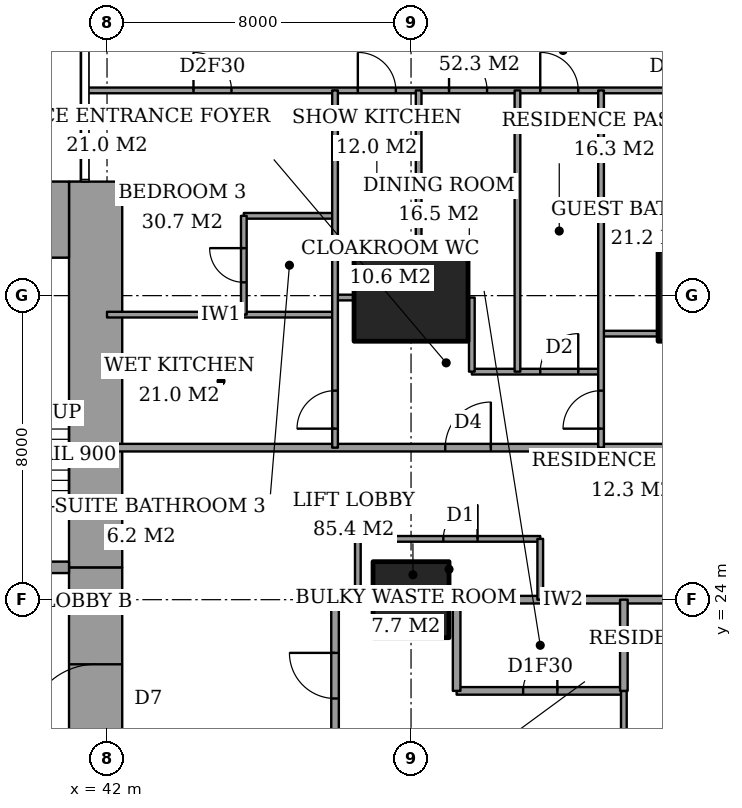
"""IFC4 building model, lengths in metres.
Left out: names, types, materials, properties, quantities, classifications, styles, units other than length and angle.
Written with IfcOpenShell. Run it as: python <this file> out.ifc"""

import sys

from ifc_helpers import new_model, si_unit, direction, frame, frame_2d, origin, origin_2d, place, context, subcontext, project, spatial, rectangle, extrude, element, fill, save


model = new_model("IFC4")
c1 = context("Model", 3, precision=1e-05, world=origin(), true_north=direction((0.0, 1.0)))
c2 = subcontext(c1, "Body", "Model", "MODEL_VIEW")
j1 = project(units=[si_unit("LENGTHUNIT", "METRE"), si_unit("PLANEANGLEUNIT", "RADIAN")], contexts=[c1])
p1 = place(None, origin())
s1 = spatial("IfcSite", under=j1, at=p1, CompositionType="ELEMENT")
p2 = place(p1, origin())
s2 = spatial("IfcBuilding", under=s1, at=p2, CompositionType="ELEMENT")
p3 = place(p2, frame((0.0, 0.0, 121.4)))
s3 = spatial("IfcBuildingStorey", under=s2, at=p3, CompositionType="ELEMENT", Elevation=121.4)
p4 = place(p3, frame((50.0, 24.0, 0.0), z_axis=(0.0, 0.0, 1.0), x_axis=(1.0, 0.0, 0.0)))
e1 = element("IfcColumn", 1, at=p4, inside=s3, PredefinedType="COLUMN", context=c2, shape_type="SweptSolid", body=[
    extrude(rectangle(XDim=2.0, YDim=2.0, at=origin_2d()), origin(), (0.0, 0.0, 1.0), 3.6),
])
for number, where, z_axis, x_axis in (
    (2, (50.0, 32.0, 0.0), (0.0, 0.0, 1.0), (1.0, 0.0, 0.0)),
    (3, (58.0, 32.0, 0.0), (0.0, 0.0, 1.0), (1.0, 0.0, 0.0)),
):
    element("IfcColumn", number, at=place(p3, frame(where, z_axis=z_axis, x_axis=x_axis)), inside=s3, PredefinedType="COLUMN", context=c2, shape_type="SweptSolid", body=[
        extrude(rectangle(XDim=3.0, YDim=2.4, at=origin_2d()), origin(), (0.0, 0.0, 1.0), 3.6),
    ])
p5 = place(p3, frame((37.85, 34.0, 0.0), z_axis=(0.0, 0.0, 1.0), x_axis=(1.0, 0.0, 0.0)))
e4 = element("IfcWall", 4, at=p5, inside=s3, PredefinedType="SHEAR", context=c2, shape_type="SweptSolid", body=[
    extrude(rectangle(XDim=3.15, YDim=2.0, at=frame_2d((1.575, 0.0))), origin(), (0.0, 0.0, 1.0), 3.6),
])
p6 = place(p3, frame((41.7, 13.0, 0.0), z_axis=(0.0, 0.0, 1.0), x_axis=(0.0, 1.0, 0.0)))
e5 = element("IfcWall", 5, at=p6, inside=s3, PredefinedType="SHEAR", context=c2, shape_type="SweptSolid", body=[
    extrude(rectangle(XDim=11.85, YDim=1.4, at=frame_2d((5.925, 0.0))), origin(), (0.0, 0.0, 1.0), 3.6),
])
p7 = place(p6, frame((7.5, 0.0, 0.0)))
e6 = element("IfcOpeningElement", 6, at=p7, cuts=e5, PredefinedType="OPENING", context=c2, shape_type="SweptSolid", body=[
    extrude(rectangle(XDim=1.8, YDim=2.4, at=frame_2d((0.9, 1.2))), frame((0.0, 0.71, 0.0), z_axis=(0.0, -1.0, 0.0), x_axis=(1.0, 0.0, 0.0)), (0.0, 0.0, 1.0), 1.42),
])
p8 = place(p3, frame((41.7, 24.85, 0.0), z_axis=(0.0, 0.0, 1.0), x_axis=(0.0, 1.0, 0.0)))
e7 = element("IfcWall", 7, at=p8, inside=s3, PredefinedType="SHEAR", context=c2, shape_type="SweptSolid", body=[
    extrude(rectangle(XDim=10.15, YDim=1.4, at=frame_2d((5.075, 0.0))), origin(), (0.0, 0.0, 1.0), 3.6),
])
p9 = place(p3, frame((37.85, 24.85, 0.0), z_axis=(0.0, 0.0, 1.0), x_axis=(1.0, 0.0, 0.0)))
e8 = element("IfcWall", 8, at=p9, inside=s3, PredefinedType="SHEAR", context=c2, shape_type="SweptSolid", body=[
    extrude(rectangle(XDim=3.15, YDim=0.3, at=frame_2d((1.575, 0.0))), origin(), (0.0, 0.0, 1.0), 3.6),
])
p10 = place(p9, frame((0.95, 0.0, 0.0)))
e9 = element("IfcOpeningElement", 9, at=p10, cuts=e8, PredefinedType="OPENING", context=c2, shape_type="SweptSolid", body=[
    extrude(rectangle(XDim=1.0, YDim=2.1, at=frame_2d((0.5, 1.05))), frame((0.0, 0.16, 0.0), z_axis=(0.0, -1.0, 0.0), x_axis=(1.0, 0.0, 0.0)), (0.0, 0.0, 1.0), 0.32),
])
p11 = place(p3, frame((51.2, 21.6, 0.0), z_axis=(0.0, 0.0, 1.0), x_axis=(1.0, 0.0, 0.0)))
e10 = element("IfcWall", 10, at=p11, inside=s3, PredefinedType="PARTITIONING", context=c2, shape_type="SweptSolid", body=[
    extrude(rectangle(XDim=4.4, YDim=0.2, at=frame_2d((2.2, 0.0))), origin(), (0.0, 0.0, 1.0), 3.35),
])
p12 = place(p11, frame((1.75, 0.0, 0.0)))
e11 = element("IfcOpeningElement", 11, at=p12, cuts=e10, PredefinedType="OPENING", context=c2, shape_type="SweptSolid", body=[
    extrude(rectangle(XDim=0.9, YDim=2.1, at=frame_2d((0.45, 1.05))), frame((0.0, 0.11, 0.0), z_axis=(0.0, -1.0, 0.0), x_axis=(1.0, 0.0, 0.0)), (0.0, 0.0, 1.0), 0.22),
])
p13 = place(p3, frame((48.0, 24.0, 0.0), z_axis=(0.0, 0.0, 1.0), x_axis=(1.0, 0.0, 0.0)))
e12 = element("IfcWall", 12, at=p13, inside=s3, PredefinedType="PARTITIONING", context=c2, shape_type="SweptSolid", body=[
    extrude(rectangle(XDim=1.0, YDim=0.2, at=frame_2d((0.5, 0.0))), origin(), (0.0, 0.0, 1.0), 3.35),
])
p14 = place(p3, frame((51.0, 24.0, 0.0), z_axis=(0.0, 0.0, 1.0), x_axis=(1.0, 0.0, 0.0)))
e13 = element("IfcWall", 13, at=p14, inside=s3, PredefinedType="PARTITIONING", context=c2, shape_type="SweptSolid", body=[
    extrude(rectangle(XDim=6.0, YDim=0.2, at=frame_2d((3.0, 0.0))), origin(), (0.0, 0.0, 1.0), 3.35),
])
p15 = place(p3, frame((48.6, 25.6, 0.0), z_axis=(0.0, 0.0, 1.0), x_axis=(1.0, 0.0, 0.0)))
e14 = element("IfcWall", 14, at=p15, inside=s3, PredefinedType="PARTITIONING", context=c2, shape_type="SweptSolid", body=[
    extrude(rectangle(XDim=4.8, YDim=0.15, at=frame_2d((2.4, 0.0))), origin(), (0.0, 0.0, 1.0), 3.35),
])
p16 = place(p15, frame((2.25, 0.0, 0.0)))
e15 = element("IfcOpeningElement", 15, at=p16, cuts=e14, PredefinedType="OPENING", context=c2, shape_type="SweptSolid", body=[
    extrude(rectangle(XDim=0.9, YDim=2.1, at=frame_2d((0.45, 1.05))), frame((0.0, 0.085, 0.0), z_axis=(0.0, -1.0, 0.0), x_axis=(1.0, 0.0, 0.0)), (0.0, 0.0, 1.0), 0.17),
])
p17 = place(p3, frame((42.0, 28.0, 0.0), z_axis=(0.0, 0.0, 1.0), x_axis=(1.0, 0.0, 0.0)))
e16 = element("IfcWall", 16, at=p17, inside=s3, PredefinedType="PARTITIONING", context=c2, shape_type="SweptSolid", body=[
    extrude(rectangle(XDim=17.275, YDim=0.2, at=frame_2d((8.637, 0.0))), origin(), (0.0, 0.0, 1.0), 3.35),
])
p18 = place(p17, frame((8.9, 0.0, 0.0)))
e17 = element("IfcOpeningElement", 17, at=p18, cuts=e16, PredefinedType="OPENING", context=c2, shape_type="SweptSolid", body=[
    extrude(rectangle(XDim=1.2, YDim=2.4, at=frame_2d((0.6, 1.2))), frame((0.0, 0.11, 0.0), z_axis=(0.0, -1.0, 0.0), x_axis=(1.0, 0.0, 0.0)), (0.0, 0.0, 1.0), 0.22),
])
p19 = place(p3, frame((51.6, 30.0, 0.0), z_axis=(0.0, 0.0, 1.0), x_axis=(1.0, 0.0, 0.0)))
e18 = element("IfcWall", 18, at=p19, inside=s3, PredefinedType="PARTITIONING", context=c2, shape_type="SweptSolid", body=[
    extrude(rectangle(XDim=3.4, YDim=0.15, at=frame_2d((1.7, 0.0))), origin(), (0.0, 0.0, 1.0), 3.35),
])
p20 = place(p19, frame((1.8, 0.0, 0.0)))
e19 = element("IfcOpeningElement", 19, at=p20, cuts=e18, PredefinedType="OPENING", context=c2, shape_type="SweptSolid", body=[
    extrude(rectangle(XDim=1.0, YDim=2.1, at=frame_2d((0.5, 1.05))), frame((0.0, 0.085, 0.0), z_axis=(0.0, -1.0, 0.0), x_axis=(1.0, 0.0, 0.0)), (0.0, 0.0, 1.0), 0.17),
])
p21 = place(p3, frame((55.0, 31.0, 0.0), z_axis=(0.0, 0.0, 1.0), x_axis=(1.0, 0.0, 0.0)))
e20 = element("IfcWall", 20, at=p21, inside=s3, PredefinedType="PARTITIONING", context=c2, shape_type="SweptSolid", body=[
    extrude(rectangle(XDim=1.5, YDim=0.15, at=frame_2d((0.75, 0.0))), origin(), (0.0, 0.0, 1.0), 3.35),
])
p22 = place(p3, frame((42.0, 31.5, 0.0), z_axis=(0.0, 0.0, 1.0), x_axis=(1.0, 0.0, 0.0)))
e21 = element("IfcWall", 21, at=p22, inside=s3, PredefinedType="PARTITIONING", context=c2, shape_type="SweptSolid", body=[
    extrude(rectangle(XDim=6.0, YDim=0.15, at=frame_2d((3.0, 0.0))), origin(), (0.0, 0.0, 1.0), 3.35),
])
p23 = place(p3, frame((48.0, 31.95, 0.0), z_axis=(0.0, 0.0, 1.0), x_axis=(1.0, 0.0, 0.0)))
e22 = element("IfcWall", 22, at=p23, inside=s3, PredefinedType="PARTITIONING", context=c2, shape_type="SweptSolid", body=[
    extrude(rectangle(XDim=0.5, YDim=0.15, at=frame_2d((0.25, 0.0))), origin(), (0.0, 0.0, 1.0), 2.634),
])
p24 = place(p3, frame((45.6, 34.1, 0.0), z_axis=(0.0, 0.0, 1.0), x_axis=(1.0, 0.0, 0.0)))
e23 = element("IfcWall", 23, at=p24, inside=s3, PredefinedType="PARTITIONING", context=c2, shape_type="SweptSolid", body=[
    extrude(rectangle(XDim=2.4, YDim=0.15, at=frame_2d((1.2, 0.0))), origin(), (0.0, 0.0, 1.0), 3.35),
])
p25 = place(p3, frame((41.439, 37.4, 0.0), z_axis=(0.0, 0.0, 1.0), x_axis=(1.0, 0.0, 0.0)))
e24 = element("IfcWall", 24, at=p25, inside=s3, PredefinedType="PARTITIONING", context=c2, shape_type="SweptSolid", body=[
    extrude(rectangle(XDim=25.011, YDim=0.15, at=frame_2d((12.505, 0.0))), origin(), (0.0, 0.0, 1.0), 3.35),
])
p26 = place(p25, frame((11.961, 0.0, 0.0)))
e25 = element("IfcOpeningElement", 25, at=p26, cuts=e24, PredefinedType="OPENING", context=c2, shape_type="SweptSolid", body=[
    extrude(rectangle(XDim=1.0, YDim=2.1, at=frame_2d((0.5, 1.05))), frame((0.0, 0.085, 0.0), z_axis=(0.0, -1.0, 0.0), x_axis=(1.0, 0.0, 0.0)), (0.0, 0.0, 1.0), 0.17),
])
p27 = place(p25, frame((20.924, 0.0, 0.0)))
e26 = element("IfcOpeningElement", 26, at=p27, cuts=e24, PredefinedType="OPENING", context=c2, shape_type="SweptSolid", body=[
    extrude(rectangle(XDim=1.0, YDim=2.1, at=frame_2d((0.5, 1.05))), frame((0.0, 0.085, 0.0), z_axis=(0.0, -1.0, 0.0), x_axis=(1.0, 0.0, 0.0)), (0.0, 0.0, 1.0), 0.17),
])
p28 = place(p25, frame((15.249, 0.0, 0.0)))
e27 = element("IfcOpeningElement", 27, at=p28, cuts=e24, PredefinedType="OPENING", context=c2, shape_type="SweptSolid", body=[
    extrude(rectangle(XDim=0.9, YDim=2.1, at=frame_2d((0.45, 1.05))), frame((0.0, 0.085, 0.0), z_axis=(0.0, -1.0, 0.0), x_axis=(1.0, 0.0, 0.0)), (0.0, 0.0, 1.0), 0.17),
])
p29 = place(p25, frame((9.561, 0.0, 0.0)))
e28 = element("IfcOpeningElement", 28, at=p29, cuts=e24, PredefinedType="OPENING", context=c2, shape_type="SweptSolid", body=[
    extrude(rectangle(XDim=1.0, YDim=2.1, at=frame_2d((0.5, 1.05))), frame((0.0, 0.085, 0.0), z_axis=(0.0, -1.0, 0.0), x_axis=(1.0, 0.0, 0.0)), (0.0, 0.0, 1.0), 0.17),
])
p30 = place(p25, frame((7.161, 0.0, 0.0)))
e29 = element("IfcOpeningElement", 29, at=p30, cuts=e24, PredefinedType="OPENING", context=c2, shape_type="SweptSolid", body=[
    extrude(rectangle(XDim=1.0, YDim=2.1, at=frame_2d((0.5, 1.05))), frame((0.0, 0.085, 0.0), z_axis=(0.0, -1.0, 0.0), x_axis=(1.0, 0.0, 0.0)), (0.0, 0.0, 1.0), 0.17),
])
p31 = place(p25, frame((2.836, 0.0, 0.0)))
e30 = element("IfcOpeningElement", 30, at=p31, cuts=e24, PredefinedType="OPENING", context=c2, shape_type="SweptSolid", body=[
    extrude(rectangle(XDim=1.0, YDim=2.1, at=frame_2d((0.5, 1.05))), frame((0.0, 0.085, 0.0), z_axis=(0.0, -1.0, 0.0), x_axis=(1.0, 0.0, 0.0)), (0.0, 0.0, 1.0), 0.17),
])
p32 = place(p3, frame((45.6, 31.5, 0.0), z_axis=(0.0, 0.0, 1.0), x_axis=(0.0, 1.0, 0.0)))
e31 = element("IfcWall", 31, at=p32, inside=s3, PredefinedType="PARTITIONING", context=c2, shape_type="SweptSolid", body=[
    extrude(rectangle(XDim=2.6, YDim=0.15, at=frame_2d((1.3, 0.0))), origin(), (0.0, 0.0, 1.0), 3.35),
])
p33 = place(p32, frame((0.85, 0.0, 0.0)))
e32 = element("IfcOpeningElement", 32, at=p33, cuts=e31, PredefinedType="OPENING", context=c2, shape_type="SweptSolid", body=[
    extrude(rectangle(XDim=0.9, YDim=2.1, at=frame_2d((0.45, 1.05))), frame((0.0, 0.085, 0.0), z_axis=(0.0, -1.0, 0.0), x_axis=(1.0, 0.0, 0.0)), (0.0, 0.0, 1.0), 0.17),
])
p34 = place(p3, frame((48.0, 17.0, 0.0), z_axis=(0.0, 0.0, 1.0), x_axis=(0.0, 1.0, 0.0)))
e33 = element("IfcWall", 33, at=p34, inside=s3, PredefinedType="PARTITIONING", context=c2, shape_type="SweptSolid", body=[
    extrude(rectangle(XDim=7.0, YDim=0.2, at=frame_2d((3.5, 0.0))), origin(), (0.0, 0.0, 1.0), 3.35),
])
p35 = place(p34, frame((4.4, 0.0, 0.0)))
e34 = element("IfcOpeningElement", 34, at=p35, cuts=e33, PredefinedType="OPENING", context=c2, shape_type="SweptSolid", body=[
    extrude(rectangle(XDim=1.2, YDim=2.4, at=frame_2d((0.6, 1.2))), frame((0.0, 0.11, 0.0), z_axis=(0.0, -1.0, 0.0), x_axis=(1.0, 0.0, 0.0)), (0.0, 0.0, 1.0), 0.22),
])
p36 = place(p34, frame((1.05, 0.0, 0.0)))
e35 = element("IfcOpeningElement", 35, at=p36, cuts=e33, PredefinedType="OPENING", context=c2, shape_type="SweptSolid", body=[
    extrude(rectangle(XDim=0.9, YDim=2.1, at=frame_2d((0.45, 1.05))), frame((0.0, 0.11, 0.0), z_axis=(0.0, -1.0, 0.0), x_axis=(1.0, 0.0, 0.0)), (0.0, 0.0, 1.0), 0.22),
])
p37 = place(p3, frame((48.0, 28.0, 0.0), z_axis=(0.0, 0.0, 1.0), x_axis=(0.0, 1.0, 0.0)))
e36 = element("IfcWall", 36, at=p37, inside=s3, PredefinedType="PARTITIONING", context=c2, shape_type="SweptSolid", body=[
    extrude(rectangle(XDim=9.4, YDim=0.15, at=frame_2d((4.7, 0.0))), origin(), (0.0, 0.0, 1.0), 3.35),
])
p38 = place(p37, frame((0.5, 0.0, 0.0)))
e37 = element("IfcOpeningElement", 37, at=p38, cuts=e36, PredefinedType="OPENING", context=c2, shape_type="SweptSolid", body=[
    extrude(rectangle(XDim=1.0, YDim=2.1, at=frame_2d((0.5, 1.05))), frame((0.0, 0.085, 0.0), z_axis=(0.0, -1.0, 0.0), x_axis=(1.0, 0.0, 0.0)), (0.0, 0.0, 1.0), 0.17),
])
p39 = place(p3, frame((48.6, 24.0, 0.0), z_axis=(0.0, 0.0, 1.0), x_axis=(0.0, 1.0, 0.0)))
e38 = element("IfcWall", 38, at=p39, inside=s3, PredefinedType="PARTITIONING", context=c2, shape_type="SweptSolid", body=[
    extrude(rectangle(XDim=1.6, YDim=0.15, at=frame_2d((0.8, 0.0))), origin(), (0.0, 0.0, 1.0), 3.35),
])
p40 = place(p3, frame((50.2, 33.2, 0.0), z_axis=(0.0, 0.0, 1.0), x_axis=(0.0, 1.0, 0.0)))
e39 = element("IfcWall", 39, at=p40, inside=s3, PredefinedType="PARTITIONING", context=c2, shape_type="SweptSolid", body=[
    extrude(rectangle(XDim=4.2, YDim=0.15, at=frame_2d((2.1, 0.0))), origin(), (0.0, 0.0, 1.0), 3.35),
])
p41 = place(p3, frame((51.2, 21.6, 0.0), z_axis=(0.0, 0.0, 1.0), x_axis=(0.0, 1.0, 0.0)))
e40 = element("IfcWall", 40, at=p41, inside=s3, PredefinedType="PARTITIONING", context=c2, shape_type="SweptSolid", body=[
    extrude(rectangle(XDim=2.4, YDim=0.2, at=frame_2d((1.2, 0.0))), origin(), (0.0, 0.0, 1.0), 3.35),
])
p42 = place(p3, frame((51.6, 30.0, 0.0), z_axis=(0.0, 0.0, 1.0), x_axis=(0.0, 1.0, 0.0)))
e41 = element("IfcWall", 41, at=p42, inside=s3, PredefinedType="PARTITIONING", context=c2, shape_type="SweptSolid", body=[
    extrude(rectangle(XDim=1.95, YDim=0.15, at=frame_2d((0.975, 0.0))), origin(), (0.0, 0.0, 1.0), 3.35),
])
p43 = place(p3, frame((52.8, 30.0, 0.0), z_axis=(0.0, 0.0, 1.0), x_axis=(0.0, 1.0, 0.0)))
e42 = element("IfcWall", 42, at=p43, inside=s3, PredefinedType="PARTITIONING", context=c2, shape_type="SweptSolid", body=[
    extrude(rectangle(XDim=7.4, YDim=0.15, at=frame_2d((3.7, 0.0))), origin(), (0.0, 0.0, 1.0), 3.35),
])
p44 = place(p3, frame((53.4, 24.0, 0.0), z_axis=(0.0, 0.0, 1.0), x_axis=(0.0, 1.0, 0.0)))
e43 = element("IfcWall", 43, at=p44, inside=s3, PredefinedType="PARTITIONING", context=c2, shape_type="SweptSolid", body=[
    extrude(rectangle(XDim=1.6, YDim=0.15, at=frame_2d((0.8, 0.0))), origin(), (0.0, 0.0, 1.0), 3.35),
])
p45 = place(p3, frame((55.0, 28.0, 0.0), z_axis=(0.0, 0.0, 1.0), x_axis=(0.0, 1.0, 0.0)))
e44 = element("IfcWall", 44, at=p45, inside=s3, PredefinedType="PARTITIONING", context=c2, shape_type="SweptSolid", body=[
    extrude(rectangle(XDim=9.4, YDim=0.15, at=frame_2d((4.7, 0.0))), origin(), (0.0, 0.0, 1.0), 3.35),
])
p46 = place(p45, frame((0.5, 0.0, 0.0)))
e45 = element("IfcOpeningElement", 45, at=p46, cuts=e44, PredefinedType="OPENING", context=c2, shape_type="SweptSolid", body=[
    extrude(rectangle(XDim=1.0, YDim=2.1, at=frame_2d((0.5, 1.05))), frame((0.0, 0.085, 0.0), z_axis=(0.0, -1.0, 0.0), x_axis=(1.0, 0.0, 0.0)), (0.0, 0.0, 1.0), 0.17),
])
p47 = place(p3, frame((55.6, 21.6, 0.0), z_axis=(0.0, 0.0, 1.0), x_axis=(0.0, 1.0, 0.0)))
e46 = element("IfcWall", 46, at=p47, inside=s3, PredefinedType="PARTITIONING", context=c2, shape_type="SweptSolid", body=[
    extrude(rectangle(XDim=2.4, YDim=0.2, at=frame_2d((1.2, 0.0))), origin(), (0.0, 0.0, 1.0), 3.35),
])
p48 = place(p3, frame((55.6, 11.0, 0.0), z_axis=(0.0, 0.0, 1.0), x_axis=(0.0, 1.0, 0.0)))
e47 = element("IfcWall", 47, at=p48, inside=s3, PredefinedType="PARTITIONING", context=c2, shape_type="SweptSolid", body=[
    extrude(rectangle(XDim=10.6, YDim=0.15, at=frame_2d((5.3, 0.0))), origin(), (0.0, 0.0, 1.0), 3.35),
])
p49 = place(p48, frame((7.8, 0.0, 0.0)))
e48 = element("IfcOpeningElement", 48, at=p49, cuts=e47, PredefinedType="OPENING", context=c2, shape_type="SweptSolid", body=[
    extrude(rectangle(XDim=1.0, YDim=2.1, at=frame_2d((0.5, 1.05))), frame((0.0, 0.085, 0.0), z_axis=(0.0, -1.0, 0.0), x_axis=(1.0, 0.0, 0.0)), (0.0, 0.0, 1.0), 0.17),
])
p50 = place(p12, origin())
e49 = element("IfcDoor", 49, at=p50, inside=s3, OperationType="SINGLE_SWING_LEFT", PredefinedType="DOOR", context=c2, shape_type="SweptSolid", body=[
    extrude(rectangle(XDim=0.9, YDim=2.1, at=frame_2d((0.45, 1.05))), frame((0.0, 0.025, 0.0), z_axis=(0.0, -1.0, 0.0), x_axis=(1.0, 0.0, 0.0)), (0.0, 0.0, 1.0), 0.05),
])
fill(e11, e49)
p51 = place(p35, origin())
e50 = element("IfcDoor", 50, at=p51, inside=s3, OperationType="SINGLE_SWING_LEFT", PredefinedType="DOOR", context=c2, shape_type="SweptSolid", body=[
    extrude(rectangle(XDim=1.2, YDim=2.4, at=frame_2d((0.6, 1.2))), frame((0.0, 0.025, 0.0), z_axis=(0.0, -1.0, 0.0), x_axis=(1.0, 0.0, 0.0)), (0.0, 0.0, 1.0), 0.05),
])
fill(e34, e50)
p52 = place(p26, origin())
e51 = element("IfcDoor", 51, at=p52, inside=s3, OperationType="SINGLE_SWING_RIGHT", PredefinedType="DOOR", context=c2, shape_type="SweptSolid", body=[
    extrude(rectangle(XDim=1.0, YDim=2.1, at=frame_2d((0.5, 1.05))), frame((0.0, 0.025, 0.0), z_axis=(0.0, -1.0, 0.0), x_axis=(1.0, 0.0, 0.0)), (0.0, 0.0, 1.0), 0.05),
])
fill(e25, e51)
p53 = place(p46, origin())
e52 = element("IfcDoor", 52, at=p53, inside=s3, OperationType="SINGLE_SWING_RIGHT", PredefinedType="DOOR", context=c2, shape_type="SweptSolid", body=[
    extrude(rectangle(XDim=1.0, YDim=2.1, at=frame_2d((0.5, 1.05))), frame((0.0, 0.025, 0.0), z_axis=(0.0, -1.0, 0.0), x_axis=(1.0, 0.0, 0.0)), (0.0, 0.0, 1.0), 0.05),
])
fill(e45, e52)
p54 = place(p18, origin())
e53 = element("IfcDoor", 53, at=p54, inside=s3, OperationType="SINGLE_SWING_LEFT", PredefinedType="DOOR", context=c2, shape_type="SweptSolid", body=[
    extrude(rectangle(XDim=1.2, YDim=2.4, at=frame_2d((0.6, 1.2))), frame((0.0, 0.025, 0.0), z_axis=(0.0, -1.0, 0.0), x_axis=(1.0, 0.0, 0.0)), (0.0, 0.0, 1.0), 0.05),
])
fill(e17, e53)
p55 = place(p20, origin())
e54 = element("IfcDoor", 54, at=p55, inside=s3, OperationType="SINGLE_SWING_LEFT", PredefinedType="DOOR", context=c2, shape_type="SweptSolid", body=[
    extrude(rectangle(XDim=1.0, YDim=2.1, at=frame_2d((0.5, 1.05))), frame((0.0, 0.025, 0.0), z_axis=(0.0, -1.0, 0.0), x_axis=(1.0, 0.0, 0.0)), (0.0, 0.0, 1.0), 0.05),
])
fill(e19, e54)
p56 = place(p29, origin())
e55 = element("IfcDoor", 55, at=p56, inside=s3, OperationType="SINGLE_SWING_RIGHT", PredefinedType="DOOR", context=c2, shape_type="SweptSolid", body=[
    extrude(rectangle(XDim=1.0, YDim=2.1, at=frame_2d((0.5, 1.05))), frame((0.0, 0.025, 0.0), z_axis=(0.0, -1.0, 0.0), x_axis=(1.0, 0.0, 0.0)), (0.0, 0.0, 1.0), 0.05),
])
fill(e28, e55)
p57 = place(p30, origin())
e56 = element("IfcDoor", 56, at=p57, inside=s3, OperationType="SINGLE_SWING_RIGHT", PredefinedType="DOOR", context=c2, shape_type="SweptSolid", body=[
    extrude(rectangle(XDim=1.0, YDim=2.1, at=frame_2d((0.5, 1.05))), frame((0.0, 0.025, 0.0), z_axis=(0.0, -1.0, 0.0), x_axis=(1.0, 0.0, 0.0)), (0.0, 0.0, 1.0), 0.05),
])
fill(e29, e56)
p58 = place(p33, origin())
e57 = element("IfcDoor", 57, at=p58, inside=s3, OperationType="SINGLE_SWING_LEFT", PredefinedType="DOOR", context=c2, shape_type="SweptSolid", body=[
    extrude(rectangle(XDim=0.9, YDim=2.1, at=frame_2d((0.45, 1.05))), frame((0.0, 0.025, 0.0), z_axis=(0.0, -1.0, 0.0), x_axis=(1.0, 0.0, 0.0)), (0.0, 0.0, 1.0), 0.05),
])
fill(e32, e57)
p59 = place(p31, origin())
e58 = element("IfcDoor", 58, at=p59, inside=s3, OperationType="SINGLE_SWING_RIGHT", PredefinedType="DOOR", context=c2, shape_type="SweptSolid", body=[
    extrude(rectangle(XDim=1.0, YDim=2.1, at=frame_2d((0.5, 1.05))), frame((0.0, 0.025, 0.0), z_axis=(0.0, -1.0, 0.0), x_axis=(1.0, 0.0, 0.0)), (0.0, 0.0, 1.0), 0.05),
])
fill(e30, e58)
p60 = place(p38, origin())
e59 = element("IfcDoor", 59, at=p60, inside=s3, OperationType="SINGLE_SWING_RIGHT", PredefinedType="DOOR", context=c2, shape_type="SweptSolid", body=[
    extrude(rectangle(XDim=1.0, YDim=2.1, at=frame_2d((0.5, 1.05))), frame((0.0, 0.025, 0.0), z_axis=(0.0, -1.0, 0.0), x_axis=(1.0, 0.0, 0.0)), (0.0, 0.0, 1.0), 0.05),
])
fill(e37, e59)
p61 = place(p16, origin())
e60 = element("IfcDoor", 60, at=p61, inside=s3, OperationType="SINGLE_SWING_LEFT", PredefinedType="DOOR", context=c2, shape_type="SweptSolid", body=[
    extrude(rectangle(XDim=0.9, YDim=2.1, at=frame_2d((0.45, 1.05))), frame((0.0, 0.025, 0.0), z_axis=(0.0, -1.0, 0.0), x_axis=(1.0, 0.0, 0.0)), (0.0, 0.0, 1.0), 0.05),
])
fill(e15, e60)
p62 = place(p7, origin())
e61 = element("IfcDoor", 61, at=p62, inside=s3, OperationType="DOUBLE_DOOR_DOUBLE_SWING", PredefinedType="DOOR", context=c2, shape_type="SweptSolid", body=[
    extrude(rectangle(XDim=1.8, YDim=2.4, at=frame_2d((0.9, 1.2))), frame((0.0, 0.025, 0.0), z_axis=(0.0, -1.0, 0.0), x_axis=(1.0, 0.0, 0.0)), (0.0, 0.0, 1.0), 0.05),
])
fill(e6, e61)
save(model, sys.argv[1])
